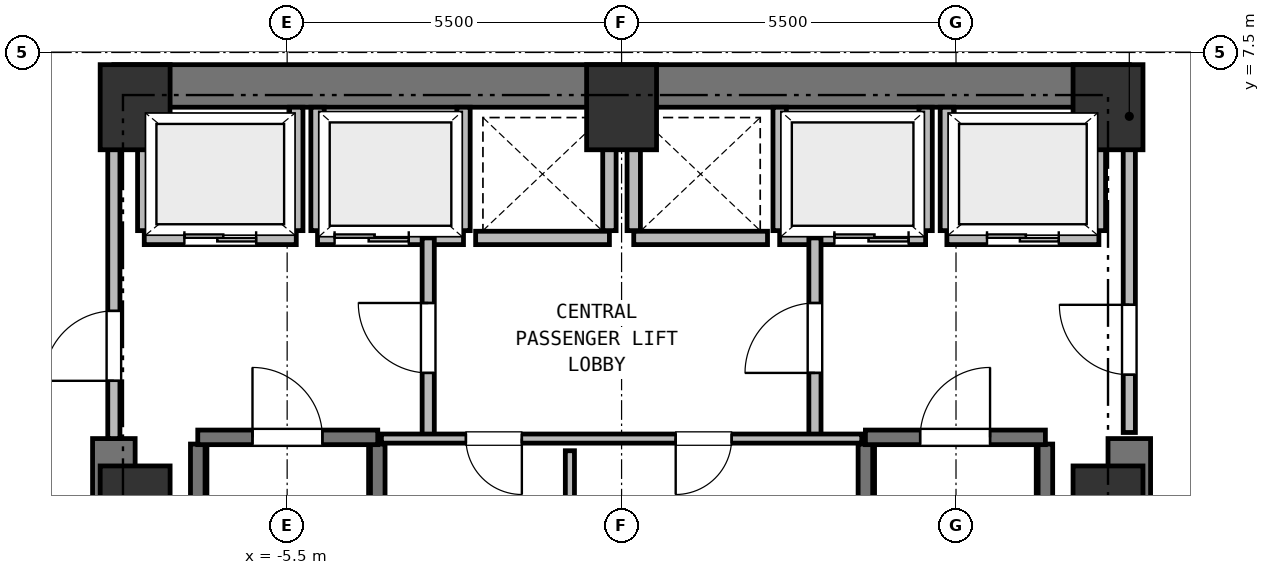
"""IFC4 building model, lengths in metres.
Left out: names, types, materials, properties, quantities, classifications, styles, units other than length and angle.
Written with IfcOpenShell. Run it as: python <this file> out.ifc"""

import sys

from ifc_helpers import new_model, si_unit, direction, frame, frame_2d, origin, origin_2d, place, context, subcontext, project, spatial, rectangle, extrude, element, fill, save


model = new_model("IFC4")
c1 = context("Model", 3, precision=1e-05, world=origin(), true_north=direction((0.0, 1.0)))
c2 = subcontext(c1, "Body", "Model", "MODEL_VIEW")
j1 = project(units=[si_unit("LENGTHUNIT", "METRE"), si_unit("PLANEANGLEUNIT", "RADIAN")], contexts=[c1])
p1 = place(None, origin())
s1 = spatial("IfcSite", under=j1, at=p1, CompositionType="ELEMENT")
p2 = place(p1, origin())
s2 = spatial("IfcBuilding", under=s1, at=p2, CompositionType="ELEMENT")
p3 = place(p2, frame((0.0, 0.0, 11.0)))
s3 = spatial("IfcBuildingStorey", under=s2, at=p3, CompositionType="ELEMENT", Elevation=11.0)
for number, where, z_axis, x_axis in (
    (1, (8.0, 0.0, 0.0), (0.0, 0.0, 1.0), (1.0, 0.0, 0.0)),
    (2, (8.0, 6.6, 0.0), (0.0, 0.0, 1.0), (1.0, 0.0, 0.0)),
    (3, (0.0, 6.6, 0.0), (0.0, 0.0, 1.0), (1.0, 0.0, 0.0)),
    (4, (-8.0, 6.6, 0.0), (0.0, 0.0, 1.0), (1.0, 0.0, 0.0)),
    (5, (-8.0, 0.0, 0.0), (0.0, 0.0, 1.0), (1.0, 0.0, 0.0)),
):
    element("IfcColumn", number, at=place(p3, frame(where, z_axis=z_axis, x_axis=x_axis)), inside=s3, PredefinedType="COLUMN", context=c2, shape_type="SweptSolid", body=[
        extrude(rectangle(XDim=1.15, YDim=1.4, at=origin_2d()), origin(), (0.0, 0.0, 1.0), 5.0),
    ])
p4 = place(p3, frame((-8.35, 6.95, 0.0), z_axis=(0.0, 0.0, 1.0), x_axis=(1.0, 0.0, 0.0)))
e6 = element("IfcWall", 6, at=p4, inside=s3, PredefinedType="SHEAR", context=c2, shape_type="SweptSolid", body=[
    extrude(rectangle(XDim=16.7, YDim=0.7, at=frame_2d((8.35, 0.0))), origin(), (0.0, 0.0, 1.0), 4.66),
])
for number, where, z_axis, x_axis in (
    (7, (-8.35, -6.95, 0.0), (0.0, 0.0, 1.0), (0.0, 1.0, 0.0)),
    (8, (8.35, -6.95, 0.0), (0.0, 0.0, 1.0), (0.0, 1.0, 0.0)),
):
    element("IfcWall", number, at=place(p3, frame(where, z_axis=z_axis, x_axis=x_axis)), inside=s3, PredefinedType="SHEAR", context=c2, shape_type="SweptSolid", body=[
        extrude(rectangle(XDim=8.1, YDim=0.7, at=frame_2d((4.05, 0.0))), origin(), (0.0, 0.0, 1.0), 4.66),
    ])
for number, where, z_axis, x_axis in (
    (9, (-6.97, -6.16, 0.0), (0.0, 0.0, 1.0), (0.0, 1.0, 0.0)),
    (10, (-4.01, -6.16, 0.0), (0.0, 0.0, 1.0), (0.0, 1.0, 0.0)),
):
    element("IfcWall", number, at=place(p3, frame(where, z_axis=z_axis, x_axis=x_axis)), inside=s3, PredefinedType="SHEAR", context=c2, shape_type="SweptSolid", body=[
        extrude(rectangle(XDim=7.22, YDim=0.24, at=frame_2d((3.61, 0.0))), origin(), (0.0, 0.0, 1.0), 4.66),
    ])
p5 = place(p3, frame((-6.97, 1.17, 0.0), z_axis=(0.0, 0.0, 1.0), x_axis=(1.0, 0.0, 0.0)))
e11 = element("IfcWall", 11, at=p5, inside=s3, PredefinedType="SHEAR", context=c2, shape_type="SweptSolid", body=[
    extrude(rectangle(XDim=2.96, YDim=0.24, at=frame_2d((1.48, 0.0))), origin(), (0.0, 0.0, 1.0), 4.66),
])
p6 = place(p5, frame((0.9, 0.0, 0.0)))
e12 = element("IfcOpeningElement", 12, at=p6, cuts=e11, PredefinedType="OPENING", context=c2, shape_type="SweptSolid", body=[
    extrude(rectangle(XDim=1.15, YDim=2.15, at=frame_2d((0.575, 1.075))), frame((0.0, 0.13, 0.0), z_axis=(0.0, -1.0, 0.0), x_axis=(1.0, 0.0, 0.0)), (0.0, 0.0, 1.0), 0.26),
])
for number, where, z_axis, x_axis in (
    (13, (4.01, -6.16, 0.0), (0.0, 0.0, 1.0), (0.0, 1.0, 0.0)),
    (14, (6.97, -6.16, 0.0), (0.0, 0.0, 1.0), (0.0, 1.0, 0.0)),
):
    element("IfcWall", number, at=place(p3, frame(where, z_axis=z_axis, x_axis=x_axis)), inside=s3, PredefinedType="SHEAR", context=c2, shape_type="SweptSolid", body=[
        extrude(rectangle(XDim=7.22, YDim=0.24, at=frame_2d((3.61, 0.0))), origin(), (0.0, 0.0, 1.0), 4.66),
    ])
p7 = place(p3, frame((4.01, 1.17, 0.0), z_axis=(0.0, 0.0, 1.0), x_axis=(1.0, 0.0, 0.0)))
e15 = element("IfcWall", 15, at=p7, inside=s3, PredefinedType="SHEAR", context=c2, shape_type="SweptSolid", body=[
    extrude(rectangle(XDim=2.96, YDim=0.24, at=frame_2d((1.48, 0.0))), origin(), (0.0, 0.0, 1.0), 4.66),
])
p8 = place(p7, frame((0.9, 0.0, 0.0)))
e16 = element("IfcOpeningElement", 16, at=p8, cuts=e15, PredefinedType="OPENING", context=c2, shape_type="SweptSolid", body=[
    extrude(rectangle(XDim=1.15, YDim=2.15, at=frame_2d((0.575, 1.075))), frame((0.0, 0.13, 0.0), z_axis=(0.0, -1.0, 0.0), x_axis=(1.0, 0.0, 0.0)), (0.0, 0.0, 1.0), 0.26),
])
p9 = place(p3, frame((-7.85, 4.45, 0.0), z_axis=(0.0, 0.0, 1.0), x_axis=(1.0, 0.0, 0.0)))
e17 = element("IfcWall", 17, at=p9, inside=s3, PredefinedType="PARTITIONING", context=c2, shape_type="SweptSolid", body=[
    extrude(rectangle(XDim=2.5, YDim=0.22, at=frame_2d((1.25, 0.0))), origin(), (0.0, 0.0, 1.0), 4.66),
])
p10 = place(p9, frame((0.66, 0.0, 0.0)))
e18 = element("IfcOpeningElement", 18, at=p10, cuts=e17, PredefinedType="OPENING", context=c2, shape_type="SweptSolid", body=[
    extrude(rectangle(XDim=1.18, YDim=2.15, at=frame_2d((0.59, 1.075))), frame((0.0, 0.12, 0.0), z_axis=(0.0, -1.0, 0.0), x_axis=(1.0, 0.0, 0.0)), (0.0, 0.0, 1.0), 0.24),
])
p11 = place(p3, frame((-7.85, 4.57, 0.0), z_axis=(0.0, 0.0, 1.0), x_axis=(0.0, 1.0, 0.0)))
e19 = element("IfcWall", 19, at=p11, inside=s3, PredefinedType="PARTITIONING", context=c2, shape_type="SweptSolid", body=[
    extrude(rectangle(XDim=2.03, YDim=0.22, at=frame_2d((1.015, 0.0))), origin(), (0.0, 0.0, 1.0), 4.24),
])
p12 = place(p3, frame((-5.35, 4.57, 0.0), z_axis=(0.0, 0.0, 1.0), x_axis=(0.0, 1.0, 0.0)))
e20 = element("IfcWall", 20, at=p12, inside=s3, PredefinedType="PARTITIONING", context=c2, shape_type="SweptSolid", body=[
    extrude(rectangle(XDim=2.03, YDim=0.22, at=frame_2d((1.015, 0.0))), origin(), (0.0, 0.0, 1.0), 4.66),
])
p13 = place(p3, frame((5.35, 4.45, 0.0), z_axis=(0.0, 0.0, 1.0), x_axis=(1.0, 0.0, 0.0)))
e21 = element("IfcWall", 21, at=p13, inside=s3, PredefinedType="PARTITIONING", context=c2, shape_type="SweptSolid", body=[
    extrude(rectangle(XDim=2.5, YDim=0.22, at=frame_2d((1.25, 0.0))), origin(), (0.0, 0.0, 1.0), 4.66),
])
p14 = place(p13, frame((0.66, 0.0, 0.0)))
e22 = element("IfcOpeningElement", 22, at=p14, cuts=e21, PredefinedType="OPENING", context=c2, shape_type="SweptSolid", body=[
    extrude(rectangle(XDim=1.18, YDim=2.15, at=frame_2d((0.59, 1.075))), frame((0.0, 0.12, 0.0), z_axis=(0.0, -1.0, 0.0), x_axis=(1.0, 0.0, 0.0)), (0.0, 0.0, 1.0), 0.24),
])
p15 = place(p3, frame((5.35, 4.57, 0.0), z_axis=(0.0, 0.0, 1.0), x_axis=(0.0, 1.0, 0.0)))
e23 = element("IfcWall", 23, at=p15, inside=s3, PredefinedType="PARTITIONING", context=c2, shape_type="SweptSolid", body=[
    extrude(rectangle(XDim=2.03, YDim=0.22, at=frame_2d((1.015, 0.0))), origin(), (0.0, 0.0, 1.0), 4.66),
])
p16 = place(p3, frame((7.85, 4.57, 0.0), z_axis=(0.0, 0.0, 1.0), x_axis=(0.0, 1.0, 0.0)))
e24 = element("IfcWall", 24, at=p16, inside=s3, PredefinedType="PARTITIONING", context=c2, shape_type="SweptSolid", body=[
    extrude(rectangle(XDim=2.03, YDim=0.22, at=frame_2d((1.015, 0.0))), origin(), (0.0, 0.0, 1.0), 4.24),
])
p17 = place(p3, frame((-5.0, 4.45, 0.0), z_axis=(0.0, 0.0, 1.0), x_axis=(1.0, 0.0, 0.0)))
e25 = element("IfcWall", 25, at=p17, inside=s3, PredefinedType="PARTITIONING", context=c2, shape_type="SweptSolid", body=[
    extrude(rectangle(XDim=2.4, YDim=0.22, at=frame_2d((1.2, 0.0))), origin(), (0.0, 0.0, 1.0), 4.66),
])
p18 = place(p17, frame((0.28, 0.0, 0.0)))
e26 = element("IfcOpeningElement", 26, at=p18, cuts=e25, PredefinedType="OPENING", context=c2, shape_type="SweptSolid", body=[
    extrude(rectangle(XDim=1.22, YDim=2.15, at=frame_2d((0.61, 1.075))), frame((0.0, 0.12, 0.0), z_axis=(0.0, -1.0, 0.0), x_axis=(1.0, 0.0, 0.0)), (0.0, 0.0, 1.0), 0.24),
])
for number, where, z_axis, x_axis in (
    (27, (-5.0, 4.57, 0.0), (0.0, 0.0, 1.0), (0.0, 1.0, 0.0)),
    (28, (-2.6, 4.57, 0.0), (0.0, 0.0, 1.0), (0.0, 1.0, 0.0)),
):
    element("IfcWall", number, at=place(p3, frame(where, z_axis=z_axis, x_axis=x_axis)), inside=s3, PredefinedType="PARTITIONING", context=c2, shape_type="SweptSolid", body=[
        extrude(rectangle(XDim=2.03, YDim=0.22, at=frame_2d((1.015, 0.0))), origin(), (0.0, 0.0, 1.0), 4.66),
    ])
p19 = place(p3, frame((2.6, 4.45, 0.0), z_axis=(0.0, 0.0, 1.0), x_axis=(1.0, 0.0, 0.0)))
e29 = element("IfcWall", 29, at=p19, inside=s3, PredefinedType="PARTITIONING", context=c2, shape_type="SweptSolid", body=[
    extrude(rectangle(XDim=2.4, YDim=0.22, at=frame_2d((1.2, 0.0))), origin(), (0.0, 0.0, 1.0), 4.66),
])
p20 = place(p19, frame((0.9, 0.0, 0.0)))
e30 = element("IfcOpeningElement", 30, at=p20, cuts=e29, PredefinedType="OPENING", context=c2, shape_type="SweptSolid", body=[
    extrude(rectangle(XDim=1.22, YDim=2.15, at=frame_2d((0.61, 1.075))), frame((0.0, 0.12, 0.0), z_axis=(0.0, -1.0, 0.0), x_axis=(1.0, 0.0, 0.0)), (0.0, 0.0, 1.0), 0.24),
])
for number, where, z_axis, x_axis in (
    (31, (2.6, 4.57, 0.0), (0.0, 0.0, 1.0), (0.0, 1.0, 0.0)),
    (32, (5.0, 4.57, 0.0), (0.0, 0.0, 1.0), (0.0, 1.0, 0.0)),
):
    element("IfcWall", number, at=place(p3, frame(where, z_axis=z_axis, x_axis=x_axis)), inside=s3, PredefinedType="PARTITIONING", context=c2, shape_type="SweptSolid", body=[
        extrude(rectangle(XDim=2.03, YDim=0.22, at=frame_2d((1.015, 0.0))), origin(), (0.0, 0.0, 1.0), 4.66),
    ])
p21 = place(p3, frame((-2.4, 4.45, 0.0), z_axis=(0.0, 0.0, 1.0), x_axis=(1.0, 0.0, 0.0)))
e33 = element("IfcWall", 33, at=p21, inside=s3, PredefinedType="PARTITIONING", context=c2, shape_type="SweptSolid", body=[
    extrude(rectangle(XDim=2.2, YDim=0.22, at=frame_2d((1.1, 0.0))), origin(), (0.0, 0.0, 1.0), 4.66),
])
p22 = place(p3, frame((-0.2, 4.57, 0.0), z_axis=(0.0, 0.0, 1.0), x_axis=(0.0, 1.0, 0.0)))
e34 = element("IfcWall", 34, at=p22, inside=s3, PredefinedType="PARTITIONING", context=c2, shape_type="SweptSolid", body=[
    extrude(rectangle(XDim=2.03, YDim=0.22, at=frame_2d((1.015, 0.0))), origin(), (0.0, 0.0, 1.0), 4.66),
])
p23 = place(p3, frame((0.2, 4.45, 0.0), z_axis=(0.0, 0.0, 1.0), x_axis=(1.0, 0.0, 0.0)))
e35 = element("IfcWall", 35, at=p23, inside=s3, PredefinedType="PARTITIONING", context=c2, shape_type="SweptSolid", body=[
    extrude(rectangle(XDim=2.2, YDim=0.22, at=frame_2d((1.1, 0.0))), origin(), (0.0, 0.0, 1.0), 4.66),
])
p24 = place(p3, frame((0.2, 4.57, 0.0), z_axis=(0.0, 0.0, 1.0), x_axis=(0.0, 1.0, 0.0)))
e36 = element("IfcWall", 36, at=p24, inside=s3, PredefinedType="PARTITIONING", context=c2, shape_type="SweptSolid", body=[
    extrude(rectangle(XDim=2.03, YDim=0.22, at=frame_2d((1.015, 0.0))), origin(), (0.0, 0.0, 1.0), 4.66),
])
p25 = place(p3, frame((-3.18, 1.15, 0.0), z_axis=(0.0, 0.0, 1.0), x_axis=(0.0, 1.0, 0.0)))
e37 = element("IfcWall", 37, at=p25, inside=s3, PredefinedType="PARTITIONING", context=c2, shape_type="SweptSolid", body=[
    extrude(rectangle(XDim=3.3, YDim=0.2, at=frame_2d((1.65, 0.0))), origin(), (0.0, 0.0, 1.0), 4.66),
])
p26 = place(p25, frame((1.08, 0.0, 0.0)))
e38 = element("IfcOpeningElement", 38, at=p26, cuts=e37, PredefinedType="OPENING", context=c2, shape_type="SweptSolid", body=[
    extrude(rectangle(XDim=1.15, YDim=2.15, at=frame_2d((0.575, 1.075))), frame((0.0, 0.11, 0.0), z_axis=(0.0, -1.0, 0.0), x_axis=(1.0, 0.0, 0.0)), (0.0, 0.0, 1.0), 0.22),
])
p27 = place(p3, frame((3.18, 1.15, 0.0), z_axis=(0.0, 0.0, 1.0), x_axis=(0.0, 1.0, 0.0)))
e39 = element("IfcWall", 39, at=p27, inside=s3, PredefinedType="PARTITIONING", context=c2, shape_type="SweptSolid", body=[
    extrude(rectangle(XDim=3.3, YDim=0.2, at=frame_2d((1.65, 0.0))), origin(), (0.0, 0.0, 1.0), 4.66),
])
p28 = place(p27, frame((1.08, 0.0, 0.0)))
e40 = element("IfcOpeningElement", 40, at=p28, cuts=e39, PredefinedType="OPENING", context=c2, shape_type="SweptSolid", body=[
    extrude(rectangle(XDim=1.15, YDim=2.15, at=frame_2d((0.575, 1.075))), frame((0.0, 0.11, 0.0), z_axis=(0.0, -1.0, 0.0), x_axis=(1.0, 0.0, 0.0)), (0.0, 0.0, 1.0), 0.22),
])
p29 = place(p3, frame((-8.35, 1.15, 0.0), z_axis=(0.0, 0.0, 1.0), x_axis=(0.0, 1.0, 0.0)))
e41 = element("IfcWall", 41, at=p29, inside=s3, PredefinedType="PARTITIONING", context=c2, shape_type="SweptSolid", body=[
    extrude(rectangle(XDim=5.4, YDim=0.2, at=frame_2d((2.7, 0.0))), origin(), (0.0, 0.0, 1.0), 4.66),
])
p30 = place(p29, frame((0.95, 0.0, 0.0)))
e42 = element("IfcOpeningElement", 42, at=p30, cuts=e41, PredefinedType="OPENING", context=c2, shape_type="SweptSolid", body=[
    extrude(rectangle(XDim=1.15, YDim=2.15, at=frame_2d((0.575, 1.075))), frame((0.0, 0.11, 0.0), z_axis=(0.0, -1.0, 0.0), x_axis=(1.0, 0.0, 0.0)), (0.0, 0.0, 1.0), 0.22),
])
p31 = place(p3, frame((8.35, 1.25, 0.0), z_axis=(0.0, 0.0, 1.0), x_axis=(0.0, 1.0, 0.0)))
e43 = element("IfcWall", 43, at=p31, inside=s3, PredefinedType="PARTITIONING", context=c2, shape_type="SweptSolid", body=[
    extrude(rectangle(XDim=5.3, YDim=0.2, at=frame_2d((2.65, 0.0))), origin(), (0.0, 0.0, 1.0), 4.66),
])
p32 = place(p31, frame((0.95, 0.0, 0.0)))
e44 = element("IfcOpeningElement", 44, at=p32, cuts=e43, PredefinedType="OPENING", context=c2, shape_type="SweptSolid", body=[
    extrude(rectangle(XDim=1.15, YDim=2.15, at=frame_2d((0.575, 1.075))), frame((0.0, 0.11, 0.0), z_axis=(0.0, -1.0, 0.0), x_axis=(1.0, 0.0, 0.0)), (0.0, 0.0, 1.0), 0.22),
])
p33 = place(p3, frame((3.95, 1.15, 0.0), z_axis=(0.0, 0.0, 1.0), x_axis=(-1.0, 0.0, 0.0)))
e45 = element("IfcWall", 45, at=p33, inside=s3, PredefinedType="PARTITIONING", context=c2, shape_type="SweptSolid", body=[
    extrude(rectangle(XDim=7.9, YDim=0.15, at=frame_2d((3.95, 0.0))), origin(), (0.0, 0.0, 1.0), 4.66),
])
p34 = place(p33, frame((5.59, 0.0, 0.0)))
e46 = element("IfcOpeningElement", 46, at=p34, cuts=e45, PredefinedType="OPENING", context=c2, shape_type="SweptSolid", body=[
    extrude(rectangle(XDim=0.92, YDim=2.05, at=frame_2d((0.46, 1.025))), frame((0.0, 0.085, 0.0), z_axis=(0.0, -1.0, 0.0), x_axis=(1.0, 0.0, 0.0)), (0.0, 0.0, 1.0), 0.17),
])
p35 = place(p33, frame((2.14, 0.0, 0.0)))
e47 = element("IfcOpeningElement", 47, at=p35, cuts=e45, PredefinedType="OPENING", context=c2, shape_type="SweptSolid", body=[
    extrude(rectangle(XDim=0.92, YDim=2.05, at=frame_2d((0.46, 1.025))), frame((0.0, 0.085, 0.0), z_axis=(0.0, -1.0, 0.0), x_axis=(1.0, 0.0, 0.0)), (0.0, 0.0, 1.0), 0.17),
])
p36 = place(p3, frame((-0.85, -4.08, 0.0), z_axis=(0.0, 0.0, 1.0), x_axis=(0.0, 1.0, 0.0)))
e48 = element("IfcWall", 48, at=p36, inside=s3, PredefinedType="PARTITIONING", context=c2, shape_type="SweptSolid", body=[
    extrude(rectangle(XDim=5.03, YDim=0.15, at=frame_2d((2.515, 0.0))), origin(), (0.0, 0.0, 1.0), 4.66),
])
p37 = place(p6, origin())
e49 = element("IfcDoor", 49, at=p37, inside=s3, OperationType="SINGLE_SWING_LEFT", PredefinedType="DOOR", context=c2, shape_type="SweptSolid", body=[
    extrude(rectangle(XDim=1.15, YDim=2.15, at=frame_2d((0.575, 1.075))), frame((0.0, 0.025, 0.0), z_axis=(0.0, -1.0, 0.0), x_axis=(1.0, 0.0, 0.0)), (0.0, 0.0, 1.0), 0.05),
])
fill(e12, e49)
p38 = place(p8, origin())
e50 = element("IfcDoor", 50, at=p38, inside=s3, OperationType="SINGLE_SWING_RIGHT", PredefinedType="DOOR", context=c2, shape_type="SweptSolid", body=[
    extrude(rectangle(XDim=1.15, YDim=2.15, at=frame_2d((0.575, 1.075))), frame((0.0, 0.025, 0.0), z_axis=(0.0, -1.0, 0.0), x_axis=(1.0, 0.0, 0.0)), (0.0, 0.0, 1.0), 0.05),
])
fill(e16, e50)
p39 = place(p10, origin())
e51 = element("IfcDoor", 51, at=p39, inside=s3, OperationType="DOUBLE_DOOR_SLIDING", PredefinedType="DOOR", context=c2, shape_type="SweptSolid", body=[
    extrude(rectangle(XDim=1.18, YDim=2.15, at=frame_2d((0.59, 1.075))), frame((0.0, 0.025, 0.0), z_axis=(0.0, -1.0, 0.0), x_axis=(1.0, 0.0, 0.0)), (0.0, 0.0, 1.0), 0.05),
])
fill(e18, e51)
p40 = place(p14, origin())
e52 = element("IfcDoor", 52, at=p40, inside=s3, OperationType="DOUBLE_DOOR_SLIDING", PredefinedType="DOOR", context=c2, shape_type="SweptSolid", body=[
    extrude(rectangle(XDim=1.18, YDim=2.15, at=frame_2d((0.59, 1.075))), frame((0.0, 0.025, 0.0), z_axis=(0.0, -1.0, 0.0), x_axis=(1.0, 0.0, 0.0)), (0.0, 0.0, 1.0), 0.05),
])
fill(e22, e52)
p41 = place(p18, origin())
e53 = element("IfcDoor", 53, at=p41, inside=s3, OperationType="DOUBLE_DOOR_SLIDING", PredefinedType="DOOR", context=c2, shape_type="SweptSolid", body=[
    extrude(rectangle(XDim=1.22, YDim=2.15, at=frame_2d((0.61, 1.075))), frame((0.0, 0.025, 0.0), z_axis=(0.0, -1.0, 0.0), x_axis=(1.0, 0.0, 0.0)), (0.0, 0.0, 1.0), 0.05),
])
fill(e26, e53)
p42 = place(p20, origin())
e54 = element("IfcDoor", 54, at=p42, inside=s3, OperationType="DOUBLE_DOOR_SLIDING", PredefinedType="DOOR", context=c2, shape_type="SweptSolid", body=[
    extrude(rectangle(XDim=1.22, YDim=2.15, at=frame_2d((0.61, 1.075))), frame((0.0, 0.025, 0.0), z_axis=(0.0, -1.0, 0.0), x_axis=(1.0, 0.0, 0.0)), (0.0, 0.0, 1.0), 0.05),
])
fill(e30, e54)
p43 = place(p26, origin())
e55 = element("IfcDoor", 55, at=p43, inside=s3, OperationType="SINGLE_SWING_RIGHT", PredefinedType="DOOR", context=c2, shape_type="SweptSolid", body=[
    extrude(rectangle(XDim=1.15, YDim=2.15, at=frame_2d((0.575, 1.075))), frame((0.0, 0.025, 0.0), z_axis=(0.0, -1.0, 0.0), x_axis=(1.0, 0.0, 0.0)), (0.0, 0.0, 1.0), 0.05),
])
fill(e38, e55)
p44 = place(p28, origin())
e56 = element("IfcDoor", 56, at=p44, inside=s3, OperationType="SINGLE_SWING_LEFT", PredefinedType="DOOR", context=c2, shape_type="SweptSolid", body=[
    extrude(rectangle(XDim=1.15, YDim=2.15, at=frame_2d((0.575, 1.075))), frame((0.0, 0.025, 0.0), z_axis=(0.0, -1.0, 0.0), x_axis=(1.0, 0.0, 0.0)), (0.0, 0.0, 1.0), 0.05),
])
fill(e40, e56)
p45 = place(p30, origin())
e57 = element("IfcDoor", 57, at=p45, inside=s3, OperationType="SINGLE_SWING_LEFT", PredefinedType="DOOR", context=c2, shape_type="SweptSolid", body=[
    extrude(rectangle(XDim=1.15, YDim=2.15, at=frame_2d((0.575, 1.075))), frame((0.0, 0.025, 0.0), z_axis=(0.0, -1.0, 0.0), x_axis=(1.0, 0.0, 0.0)), (0.0, 0.0, 1.0), 0.05),
])
fill(e42, e57)
p46 = place(p32, origin())
e58 = element("IfcDoor", 58, at=p46, inside=s3, OperationType="SINGLE_SWING_RIGHT", PredefinedType="DOOR", context=c2, shape_type="SweptSolid", body=[
    extrude(rectangle(XDim=1.15, YDim=2.15, at=frame_2d((0.575, 1.075))), frame((0.0, 0.025, 0.0), z_axis=(0.0, -1.0, 0.0), x_axis=(1.0, 0.0, 0.0)), (0.0, 0.0, 1.0), 0.05),
])
fill(e44, e58)
p47 = place(p34, origin())
e59 = element("IfcDoor", 59, at=p47, inside=s3, OperationType="SINGLE_SWING_LEFT", PredefinedType="DOOR", context=c2, shape_type="SweptSolid", body=[
    extrude(rectangle(XDim=0.92, YDim=2.05, at=frame_2d((0.46, 1.025))), frame((0.0, 0.025, 0.0), z_axis=(0.0, -1.0, 0.0), x_axis=(1.0, 0.0, 0.0)), (0.0, 0.0, 1.0), 0.05),
])
fill(e46, e59)
p48 = place(p35, origin())
e60 = element("IfcDoor", 60, at=p48, inside=s3, OperationType="SINGLE_SWING_RIGHT", PredefinedType="DOOR", context=c2, shape_type="SweptSolid", body=[
    extrude(rectangle(XDim=0.92, YDim=2.05, at=frame_2d((0.46, 1.025))), frame((0.0, 0.025, 0.0), z_axis=(0.0, -1.0, 0.0), x_axis=(1.0, 0.0, 0.0)), (0.0, 0.0, 1.0), 0.05),
])
fill(e47, e60)
save(model, sys.argv[1])
